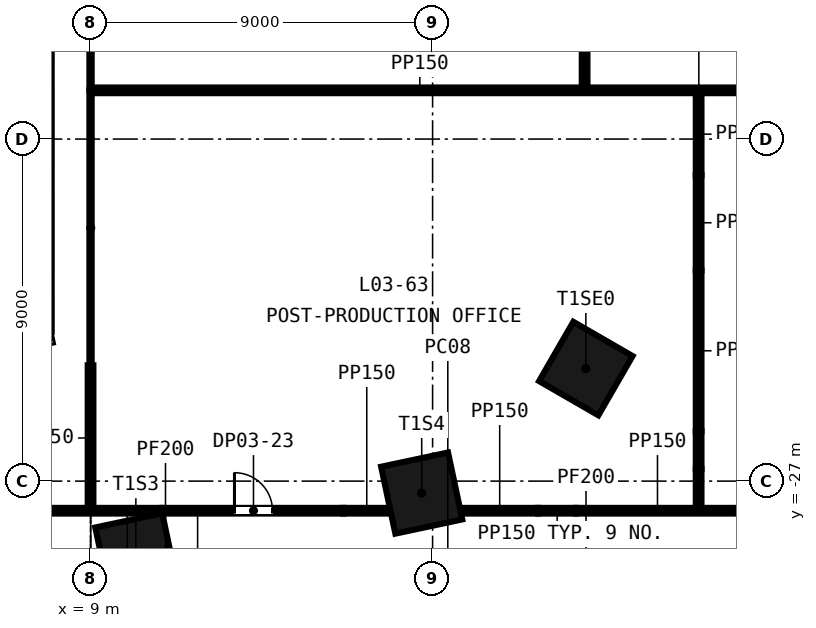
"""IFC4 building model, lengths in metres.
Left out: names, types, materials, properties, quantities, classifications, styles, units other than length and angle.
Written with IfcOpenShell. Run it as: python <this file> out.ifc"""

import sys

from ifc_helpers import new_model, si_unit, direction, frame, frame_2d, origin, origin_2d, place, context, subcontext, project, spatial, rectangle, extrude, element, fill, save


model = new_model("IFC4")
c1 = context("Model", 3, precision=1e-05, world=origin(), true_north=direction((0.0, 1.0)))
c2 = subcontext(c1, "Body", "Model", "MODEL_VIEW")
j1 = project(units=[si_unit("LENGTHUNIT", "METRE"), si_unit("PLANEANGLEUNIT", "RADIAN")], contexts=[c1])
p1 = place(None, origin())
s1 = spatial("IfcSite", under=j1, at=p1, CompositionType="ELEMENT")
p2 = place(p1, origin())
s2 = spatial("IfcBuilding", under=s1, at=p2, CompositionType="ELEMENT")
p3 = place(p2, frame((0.0, 0.0, 22.5)))
s3 = spatial("IfcBuildingStorey", under=s2, at=p3, CompositionType="ELEMENT", Elevation=22.5)
for number, where, z_axis, x_axis in (
    (1, (10.192, -28.914, -0.3), (0.0, 0.0, 1.0), (0.978, 0.208, 0.0)),
    (2, (17.714, -27.315, -0.3), (0.0, 0.0, 1.0), (0.978, 0.208, 0.0)),
    (3, (22.032, -24.039, -0.3), (0.0, 0.0, 1.0), (0.5, 0.866, 0.0)),
):
    element("IfcColumn", number, at=place(p3, frame(where, z_axis=z_axis, x_axis=x_axis)), inside=s3, PredefinedType="COLUMN", context=c2, shape_type="SweptSolid", body=[
        extrude(rectangle(XDim=1.8, YDim=1.8, at=origin_2d()), origin(), (0.0, 0.0, 1.0), 4.5),
    ])
p4 = place(p3, frame((0.75, -27.779, 0.0), z_axis=(0.0, 0.0, 1.0), x_axis=(1.0, 0.0, 0.0)))
e4 = element("IfcWall", 4, at=p4, inside=s3, PredefinedType="PARTITIONING", context=c2, shape_type="SweptSolid", body=[
    extrude(rectangle(XDim=8.175, YDim=0.15, at=frame_2d((4.087, 0.0))), origin(), (0.0, 0.0, 1.0), 4.2),
])
p5 = place(p3, frame((9.075, -27.779, 0.0), z_axis=(0.0, 0.0, 1.0), x_axis=(1.0, 0.0, 0.0)))
e5 = element("IfcWall", 5, at=p5, inside=s3, PredefinedType="PARTITIONING", context=c2, shape_type="SweptSolid", body=[
    extrude(rectangle(XDim=1.773, YDim=0.15, at=frame_2d((0.886, 0.0))), origin(), (0.0, 0.0, 1.0), 4.2),
])
p6 = place(p3, frame((10.887, -27.779, 0.0), z_axis=(0.0, 0.0, 1.0), x_axis=(1.0, 0.0, 0.0)))
e6 = element("IfcWall", 6, at=p6, inside=s3, PredefinedType="PARTITIONING", context=c2, shape_type="SweptSolid", body=[
    extrude(rectangle(XDim=4.762, YDim=0.15, at=frame_2d((2.381, 0.0))), origin(), (0.0, 0.0, 1.0), 4.2),
])
p7 = place(p6, frame((1.9, 0.0, 0.0)))
e7 = element("IfcOpeningElement", 7, at=p7, cuts=e6, PredefinedType="OPENING", context=c2, shape_type="SweptSolid", body=[
    extrude(rectangle(XDim=1.0, YDim=2.1, at=frame_2d((0.5, 1.05))), frame((0.0, 0.085, 0.0), z_axis=(0.0, -1.0, 0.0), x_axis=(1.0, 0.0, 0.0)), (0.0, 0.0, 1.0), 0.17),
])
p8 = place(p3, frame((15.65, -27.779, 0.0), z_axis=(0.0, 0.0, 1.0), x_axis=(1.0, 0.0, 0.0)))
e8 = element("IfcWall", 8, at=p8, inside=s3, PredefinedType="PARTITIONING", context=c2, shape_type="SweptSolid", body=[
    extrude(rectangle(XDim=1.227, YDim=0.15, at=frame_2d((0.613, 0.0))), origin(), (0.0, 0.0, 1.0), 3.2),
])
p9 = place(p3, frame((18.748, -27.779, 0.0), z_axis=(0.0, 0.0, 1.0), x_axis=(1.0, 0.0, 0.0)))
e9 = element("IfcWall", 9, at=p9, inside=s3, PredefinedType="PARTITIONING", context=c2, shape_type="SweptSolid", body=[
    extrude(rectangle(XDim=2.024, YDim=0.15, at=frame_2d((1.012, 0.0))), origin(), (0.0, 0.0, 1.0), 4.2),
])
p10 = place(p3, frame((20.773, -27.779, 0.0), z_axis=(0.0, 0.0, 1.0), x_axis=(1.0, 0.0, 0.0)))
e10 = element("IfcWall", 10, at=p10, inside=s3, PredefinedType="PARTITIONING", context=c2, shape_type="SweptSolid", body=[
    extrude(rectangle(XDim=1.0, YDim=0.15, at=frame_2d((0.5, 0.0))), origin(), (0.0, 0.0, 1.0), 3.298),
])
p11 = place(p3, frame((21.773, -27.779, 0.0), z_axis=(0.0, 0.0, 1.0), x_axis=(1.0, 0.0, 0.0)))
e11 = element("IfcWall", 11, at=p11, inside=s3, PredefinedType="PARTITIONING", context=c2, shape_type="SweptSolid", body=[
    extrude(rectangle(XDim=4.279, YDim=0.15, at=frame_2d((2.14, 0.0))), origin(), (0.0, 0.0, 1.0), 4.2),
])
p12 = place(p3, frame((9.03, -16.718, 0.0), z_axis=(0.0, 0.0, 1.0), x_axis=(1.0, 0.0, 0.0)))
e12 = element("IfcWall", 12, at=p12, inside=s3, PredefinedType="PARTITIONING", context=c2, shape_type="SweptSolid", body=[
    extrude(rectangle(XDim=17.258, YDim=0.15, at=frame_2d((8.629, 0.0))), origin(), (0.0, 0.0, 1.0), 4.2),
])
p13 = place(p3, frame((9.0, -27.778, 0.0), z_axis=(0.0, 0.0, 1.0), x_axis=(0.0, 1.0, 0.0)))
e13 = element("IfcWall", 13, at=p13, inside=s3, PredefinedType="PARTITIONING", context=c2, shape_type="SweptSolid", body=[
    extrude(rectangle(XDim=3.825, YDim=0.15, at=frame_2d((1.913, 0.0))), origin(), (0.0, 0.0, 1.0), 4.2),
])
p14 = place(p3, frame((9.0, -23.953, 0.0), z_axis=(0.0, 0.0, 1.0), x_axis=(0.0, 1.0, 0.0)))
e14 = element("IfcWall", 14, at=p14, inside=s3, PredefinedType="PARTITIONING", context=c2, shape_type="SweptSolid", body=[
    extrude(rectangle(XDim=7.233, YDim=0.06, at=frame_2d((3.617, 0.0))), origin(), (0.0, 0.0, 1.0), 4.2),
])
p15 = place(p3, frame((9.0, -16.717, 0.0), z_axis=(0.0, 0.0, 1.0), x_axis=(0.0, 1.0, 0.0)))
e15 = element("IfcWall", 15, at=p15, inside=s3, PredefinedType="PARTITIONING", context=c2, shape_type="SweptSolid", body=[
    extrude(rectangle(XDim=7.716, YDim=0.06, at=frame_2d((3.858, 0.0))), origin(), (0.0, 0.0, 1.0), 4.2),
])
p16 = place(p3, frame((22.0, -16.643, 0.0), z_axis=(0.0, 0.0, 1.0), x_axis=(0.0, 1.0, 0.0)))
e16 = element("IfcWall", 16, at=p16, inside=s3, PredefinedType="PARTITIONING", context=c2, shape_type="SweptSolid", body=[
    extrude(rectangle(XDim=13.368, YDim=0.15, at=frame_2d((6.684, 0.0))), origin(), (0.0, 0.0, 1.0), 4.2),
])
p17 = place(p3, frame((25.0, -27.704, 0.0), z_axis=(0.0, 0.0, 1.0), x_axis=(0.0, 1.0, 0.0)))
e17 = element("IfcWall", 17, at=p17, inside=s3, PredefinedType="PARTITIONING", context=c2, shape_type="SweptSolid", body=[
    extrude(rectangle(XDim=1.019, YDim=0.15, at=frame_2d((0.509, 0.0))), origin(), (0.0, 0.0, 1.0), 4.2),
])
p18 = place(p3, frame((25.0, -26.685, 0.0), z_axis=(0.0, 0.0, 1.0), x_axis=(0.0, 1.0, 0.0)))
e18 = element("IfcWall", 18, at=p18, inside=s3, PredefinedType="PARTITIONING", context=c2, shape_type="SweptSolid", body=[
    extrude(rectangle(XDim=1.0, YDim=0.15, at=frame_2d((0.5, 0.0))), origin(), (0.0, 0.0, 1.0), 3.219),
])
p19 = place(p3, frame((25.0, -25.685, 0.0), z_axis=(0.0, 0.0, 1.0), x_axis=(0.0, 1.0, 0.0)))
e19 = element("IfcWall", 19, at=p19, inside=s3, PredefinedType="PARTITIONING", context=c2, shape_type="SweptSolid", body=[
    extrude(rectangle(XDim=4.23, YDim=0.15, at=frame_2d((2.115, 0.0))), origin(), (0.0, 0.0, 1.0), 4.2),
])
p20 = place(p3, frame((25.0, -21.456, 0.0), z_axis=(0.0, 0.0, 1.0), x_axis=(0.0, 1.0, 0.0)))
e20 = element("IfcWall", 20, at=p20, inside=s3, PredefinedType="PARTITIONING", context=c2, shape_type="SweptSolid", body=[
    extrude(rectangle(XDim=2.507, YDim=0.15, at=frame_2d((1.253, 0.0))), origin(), (0.0, 0.0, 1.0), 3.111),
])
p21 = place(p3, frame((25.0, -18.949, 0.0), z_axis=(0.0, 0.0, 1.0), x_axis=(0.0, 1.0, 0.0)))
e21 = element("IfcWall", 21, at=p21, inside=s3, PredefinedType="PARTITIONING", context=c2, shape_type="SweptSolid", body=[
    extrude(rectangle(XDim=2.156, YDim=0.15, at=frame_2d((1.078, 0.0))), origin(), (0.0, 0.0, 1.0), 4.2),
])
p22 = place(p7, origin())
e22 = element("IfcDoor", 22, at=p22, inside=s3, OperationType="SINGLE_SWING_LEFT", PredefinedType="DOOR", context=c2, shape_type="SweptSolid", body=[
    extrude(rectangle(XDim=1.0, YDim=2.1, at=frame_2d((0.5, 1.05))), frame((0.0, 0.025, 0.0), z_axis=(0.0, -1.0, 0.0), x_axis=(1.0, 0.0, 0.0)), (0.0, 0.0, 1.0), 0.05),
])
fill(e7, e22)
save(model, sys.argv[1])
